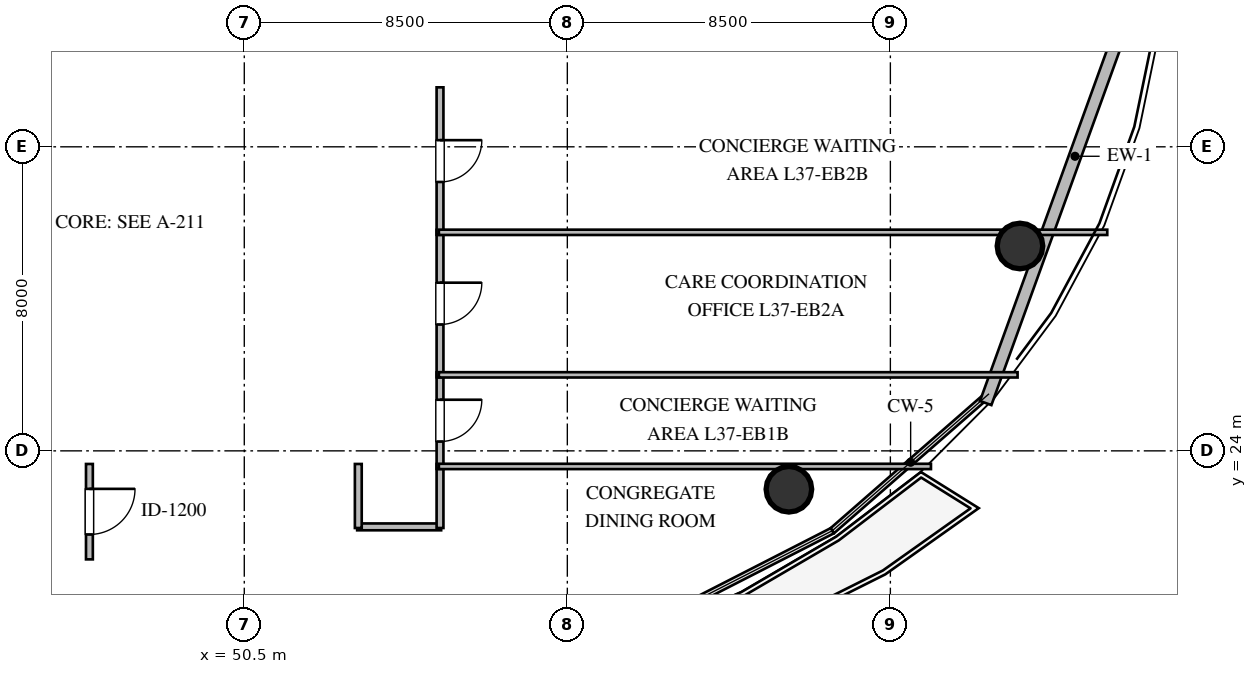
"""IFC4 building model, lengths in metres.
Left out: names, types, materials, properties, quantities, classifications, styles, units other than length and angle.
Written with IfcOpenShell. Run it as: python <this file> out.ifc"""

import sys

from ifc_helpers import new_model, si_unit, direction, frame, frame_2d, origin, origin_2d, place, context, subcontext, project, spatial, rectangle, circle, extrude, element, fill, save


model = new_model("IFC4")
c1 = context("Model", 3, precision=1e-05, world=origin(), true_north=direction((0.0, 1.0)))
c2 = subcontext(c1, "Body", "Model", "MODEL_VIEW")
j1 = project(units=[si_unit("LENGTHUNIT", "METRE"), si_unit("PLANEANGLEUNIT", "RADIAN")], contexts=[c1])
p1 = place(None, origin())
s1 = spatial("IfcSite", under=j1, at=p1, CompositionType="ELEMENT")
p2 = place(p1, origin())
s2 = spatial("IfcBuilding", under=s1, at=p2, CompositionType="ELEMENT")
p3 = place(p2, frame((0.0, 0.0, 142.2)))
s3 = spatial("IfcBuildingStorey", under=s2, at=p3, CompositionType="ELEMENT", Elevation=142.2)
for number, where, z_axis, x_axis in (
    (1, (64.83, 22.99, 0.0), (0.0, 0.0, 1.0), (1.0, 0.0, 0.0)),
    (2, (70.91, 29.39, 0.0), (0.0, 0.0, 1.0), (1.0, 0.0, 0.0)),
):
    element("IfcColumn", number, at=place(p3, frame(where, z_axis=z_axis, x_axis=x_axis)), inside=s3, PredefinedType="COLUMN", context=c2, shape_type="SweptSolid", body=[
        extrude(circle(Radius=0.6, at=origin_2d()), origin(), (0.0, 0.0, 1.0), 3.6),
    ])
p4 = place(p3, frame((74.708, 38.244, 0.0), z_axis=(0.0, 0.0, 1.0), x_axis=(-0.340324669139, -0.94030799187, 0.0)))
e3 = element("IfcWall", 3, at=p4, inside=s3, PredefinedType="STANDARD", context=c2, shape_type="SweptSolid", body=[
    extrude(rectangle(XDim=13.81, YDim=0.32, at=frame_2d((6.905, 0.0))), origin(), (0.0, 0.0, 1.0), 3.36),
])
p5 = place(p3, frame((46.425, 23.655, 0.0), z_axis=(0.0, 0.0, 1.0), x_axis=(0.0, -1.0, 0.0)))
e4 = element("IfcWall", 4, at=p5, inside=s3, PredefinedType="PARTITIONING", context=c2, shape_type="SweptSolid", body=[
    extrude(rectangle(XDim=2.51, YDim=0.18, at=frame_2d((1.255, 0.0))), origin(), (0.0, 0.0, 1.0), 3.36),
])
p6 = place(p5, frame((0.655, 0.0, 0.0)))
e5 = element("IfcOpeningElement", 5, at=p6, cuts=e4, PredefinedType="OPENING", context=c2, shape_type="SweptSolid", body=[
    extrude(rectangle(XDim=1.2, YDim=2.15, at=frame_2d((0.6, 1.075))), frame((0.0, 0.1, 0.0), z_axis=(0.0, -1.0, 0.0), x_axis=(1.0, 0.0, 0.0)), (0.0, 0.0, 1.0), 0.2),
])
p7 = place(p3, frame((55.68, 22.0, 0.0), z_axis=(0.0, 0.0, 1.0), x_axis=(-1.0, 0.0, 0.0)))
e6 = element("IfcWall", 6, at=p7, inside=s3, PredefinedType="PARTITIONING", context=c2, shape_type="SweptSolid", body=[
    extrude(rectangle(XDim=2.21, YDim=0.18, at=frame_2d((1.105, 0.0))), origin(), (0.0, 0.0, 1.0), 3.36),
])
for number, where, z_axis, x_axis in (
    (7, (55.65, 23.655, 0.0), (0.0, 0.0, 1.0), (0.0, -1.0, 0.0)),
    (8, (53.5, 21.97, 0.0), (0.0, 0.0, 1.0), (0.0, 1.0, 0.0)),
):
    element("IfcWall", number, at=place(p3, frame(where, z_axis=z_axis, x_axis=x_axis)), inside=s3, PredefinedType="PARTITIONING", context=c2, shape_type="SweptSolid", body=[
        extrude(rectangle(XDim=1.685, YDim=0.18, at=frame_2d((0.843, 0.0))), origin(), (0.0, 0.0, 1.0), 3.36),
    ])
p8 = place(p3, frame((55.65, 26.065, 0.0), z_axis=(0.0, 0.0, 1.0), x_axis=(0.0, -1.0, 0.0)))
e9 = element("IfcWall", 9, at=p8, inside=s3, PredefinedType="PARTITIONING", context=c2, shape_type="SweptSolid", body=[
    extrude(rectangle(XDim=2.54, YDim=0.18, at=frame_2d((1.27, 0.0))), origin(), (0.0, 0.0, 1.0), 3.36),
])
p9 = place(p8, frame((0.72, 0.0, 0.0)))
e10 = element("IfcOpeningElement", 10, at=p9, cuts=e9, PredefinedType="OPENING", context=c2, shape_type="SweptSolid", body=[
    extrude(rectangle(XDim=1.1, YDim=2.1, at=frame_2d((0.55, 1.05))), frame((0.0, 0.1, 0.0), z_axis=(0.0, -1.0, 0.0), x_axis=(1.0, 0.0, 0.0)), (0.0, 0.0, 1.0), 0.2),
])
p10 = place(p3, frame((55.65, 29.815, 0.0), z_axis=(0.0, 0.0, 1.0), x_axis=(0.0, -1.0, 0.0)))
e11 = element("IfcWall", 11, at=p10, inside=s3, PredefinedType="PARTITIONING", context=c2, shape_type="SweptSolid", body=[
    extrude(rectangle(XDim=3.88, YDim=0.18, at=frame_2d((1.94, 0.0))), origin(), (0.0, 0.0, 1.0), 3.36),
])
p11 = place(p10, frame((1.39, 0.0, 0.0)))
e12 = element("IfcOpeningElement", 12, at=p11, cuts=e11, PredefinedType="OPENING", context=c2, shape_type="SweptSolid", body=[
    extrude(rectangle(XDim=1.1, YDim=2.1, at=frame_2d((0.55, 1.05))), frame((0.0, 0.1, 0.0), z_axis=(0.0, -1.0, 0.0), x_axis=(1.0, 0.0, 0.0)), (0.0, 0.0, 1.0), 0.2),
])
p12 = place(p3, frame((55.65, 33.565, 0.0), z_axis=(0.0, 0.0, 1.0), x_axis=(0.0, -1.0, 0.0)))
e13 = element("IfcWall", 13, at=p12, inside=s3, PredefinedType="PARTITIONING", context=c2, shape_type="SweptSolid", body=[
    extrude(rectangle(XDim=3.88, YDim=0.18, at=frame_2d((1.94, 0.0))), origin(), (0.0, 0.0, 1.0), 3.36),
])
p13 = place(p12, frame((1.39, 0.0, 0.0)))
e14 = element("IfcOpeningElement", 14, at=p13, cuts=e13, PredefinedType="OPENING", context=c2, shape_type="SweptSolid", body=[
    extrude(rectangle(XDim=1.1, YDim=2.1, at=frame_2d((0.55, 1.05))), frame((0.0, 0.1, 0.0), z_axis=(0.0, -1.0, 0.0), x_axis=(1.0, 0.0, 0.0)), (0.0, 0.0, 1.0), 0.2),
])
p14 = place(p3, frame((55.62, 23.59, 0.0), z_axis=(0.0, 0.0, 1.0), x_axis=(1.0, 0.0, 0.0)))
e15 = element("IfcWall", 15, at=p14, inside=s3, PredefinedType="PARTITIONING", context=c2, shape_type="SweptSolid", body=[
    extrude(rectangle(XDim=12.948, YDim=0.14, at=frame_2d((6.474, 0.0))), origin(), (0.0, 0.0, 1.0), 2.89),
])
p15 = place(p3, frame((55.62, 26.0, 0.0), z_axis=(0.0, 0.0, 1.0), x_axis=(1.0, 0.0, 0.0)))
e16 = element("IfcWall", 16, at=p15, inside=s3, PredefinedType="PARTITIONING", context=c2, shape_type="SweptSolid", body=[
    extrude(rectangle(XDim=15.227, YDim=0.14, at=frame_2d((7.613, 0.0))), origin(), (0.0, 0.0, 1.0), 2.89),
])
p16 = place(p3, frame((55.62, 29.75, 0.0), z_axis=(0.0, 0.0, 1.0), x_axis=(1.0, 0.0, 0.0)))
e17 = element("IfcWall", 17, at=p16, inside=s3, PredefinedType="PARTITIONING", context=c2, shape_type="SweptSolid", body=[
    extrude(rectangle(XDim=17.587, YDim=0.14, at=frame_2d((8.793, 0.0))), origin(), (0.0, 0.0, 1.0), 2.89),
])
p17 = place(p6, origin())
e18 = element("IfcDoor", 18, at=p17, inside=s3, OperationType="SINGLE_SWING_LEFT", PredefinedType="DOOR", context=c2, shape_type="SweptSolid", body=[
    extrude(rectangle(XDim=1.2, YDim=2.15, at=frame_2d((0.6, 1.075))), frame((0.0, 0.025, 0.0), z_axis=(0.0, -1.0, 0.0), x_axis=(1.0, 0.0, 0.0)), (0.0, 0.0, 1.0), 0.05),
])
fill(e5, e18)
p18 = place(p9, origin())
e19 = element("IfcDoor", 19, at=p18, inside=s3, OperationType="SINGLE_SWING_LEFT", PredefinedType="DOOR", context=c2, shape_type="SweptSolid", body=[
    extrude(rectangle(XDim=1.1, YDim=2.1, at=frame_2d((0.55, 1.05))), frame((0.0, 0.025, 0.0), z_axis=(0.0, -1.0, 0.0), x_axis=(1.0, 0.0, 0.0)), (0.0, 0.0, 1.0), 0.05),
])
fill(e10, e19)
p19 = place(p11, origin())
e20 = element("IfcDoor", 20, at=p19, inside=s3, OperationType="SINGLE_SWING_LEFT", PredefinedType="DOOR", context=c2, shape_type="SweptSolid", body=[
    extrude(rectangle(XDim=1.1, YDim=2.1, at=frame_2d((0.55, 1.05))), frame((0.0, 0.025, 0.0), z_axis=(0.0, -1.0, 0.0), x_axis=(1.0, 0.0, 0.0)), (0.0, 0.0, 1.0), 0.05),
])
fill(e12, e20)
p20 = place(p13, origin())
e21 = element("IfcDoor", 21, at=p20, inside=s3, OperationType="SINGLE_SWING_LEFT", PredefinedType="DOOR", context=c2, shape_type="SweptSolid", body=[
    extrude(rectangle(XDim=1.1, YDim=2.1, at=frame_2d((0.55, 1.05))), frame((0.0, 0.025, 0.0), z_axis=(0.0, -1.0, 0.0), x_axis=(1.0, 0.0, 0.0)), (0.0, 0.0, 1.0), 0.05),
])
fill(e14, e21)
save(model, sys.argv[1])
